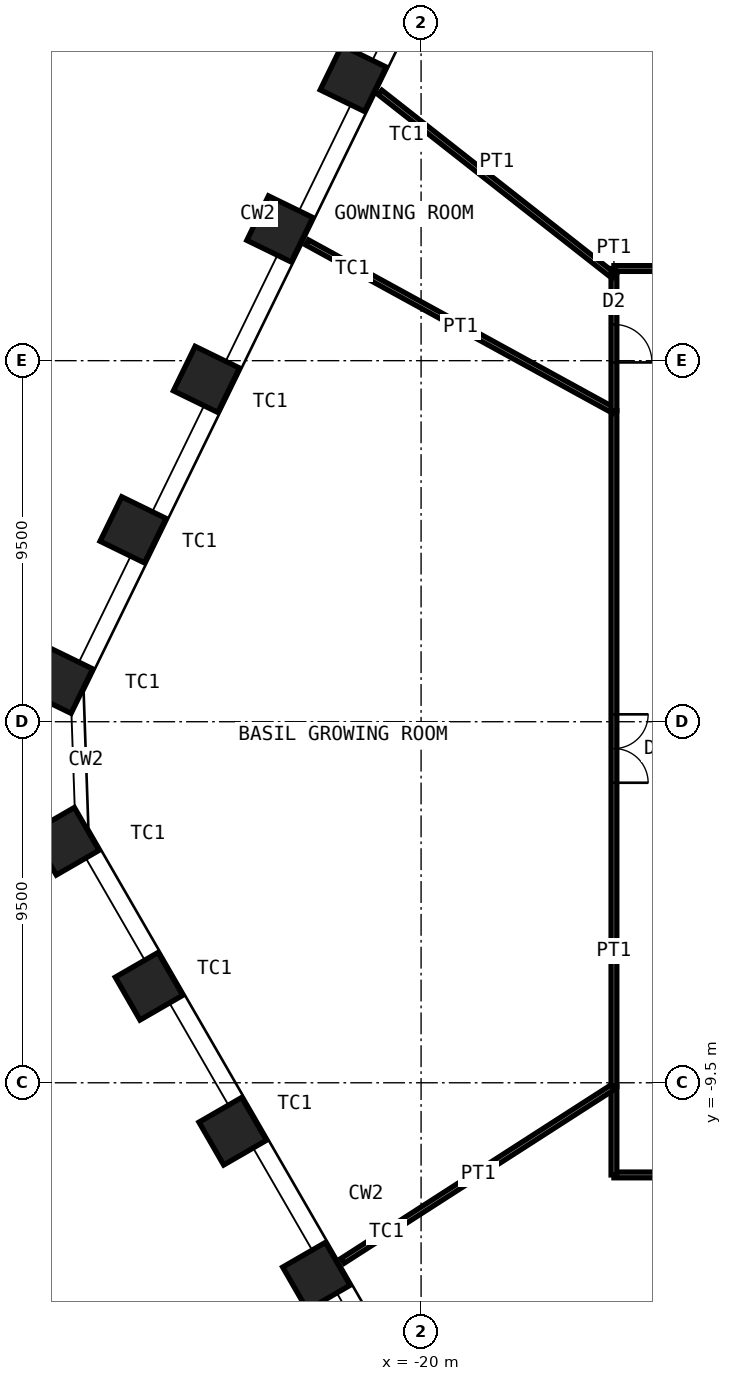
"""IFC4 building model, lengths in metres.
Left out: names, types, materials, properties, quantities, classifications, styles, units other than length and angle.
Written with IfcOpenShell. Run it as: python <this file> out.ifc"""

import sys

from ifc_helpers import new_model, si_unit, direction, frame, frame_2d, origin, origin_2d, place, context, subcontext, project, spatial, rectangle, hollow_rectangle, extrude, element, fill, save


model = new_model("IFC4")
c1 = context("Model", 3, precision=1e-05, world=origin(), true_north=direction((0.0, 1.0)))
c2 = subcontext(c1, "Body", "Model", "MODEL_VIEW")
j1 = project(units=[si_unit("LENGTHUNIT", "METRE"), si_unit("PLANEANGLEUNIT", "RADIAN")], contexts=[c1])
p1 = place(None, origin())
s1 = spatial("IfcSite", under=j1, at=p1, CompositionType="ELEMENT")
p2 = place(p1, origin())
s2 = spatial("IfcBuilding", under=s1, at=p2, CompositionType="ELEMENT")
p3 = place(p2, frame((0.0, 0.0, 52.0)))
s3 = spatial("IfcBuildingStorey", under=s2, at=p3, CompositionType="ELEMENT", Elevation=52.0)
for number, where, z_axis, x_axis in (
    (1, (-22.754, -14.589, 0.0), (0.0, 0.0, 1.0), (0.5, -0.866, 0.0)),
    (2, (-24.956, -10.775, 0.0), (0.0, 0.0, 1.0), (0.5, -0.866, 0.0)),
    (3, (-27.158, -6.96, 0.0), (0.0, 0.0, 1.0), (0.5, -0.866, 0.0)),
    (4, (-29.361, -3.146, 0.0), (0.0, 0.0, 1.0), (0.5, -0.866, 0.0)),
    (5, (-29.509, 1.09, 0.0), (0.0, 0.0, 1.0), (-0.438, -0.899, 0.0)),
    (6, (-27.578, 5.049, 0.0), (0.0, 0.0, 1.0), (-0.438, -0.899, 0.0)),
    (7, (-25.647, 9.008, 0.0), (0.0, 0.0, 1.0), (-0.438, -0.899, 0.0)),
    (8, (-23.716, 12.966, 0.0), (0.0, 0.0, 1.0), (-0.438, -0.899, 0.0)),
    (9, (-21.785, 16.925, 0.0), (0.0, 0.0, 1.0), (-0.438, -0.899, 0.0)),
):
    element("IfcColumn", number, at=place(p3, frame(where, z_axis=z_axis, x_axis=x_axis)), inside=s3, PredefinedType="COLUMN", context=c2, shape_type="SweptSolid", body=[
        extrude(hollow_rectangle(XDim=1.3, YDim=1.3, WallThickness=0.1, at=origin_2d()), origin(), (0.0, 0.0, 1.0), 5.0),
    ])
p4 = place(p3, frame((-5.516, -11.925, 0.0), z_axis=(0.0, 0.0, 1.0), x_axis=(-1.0, 0.0, 0.0)))
e10 = element("IfcWall", 10, at=p4, inside=s3, PredefinedType="PARTITIONING", context=c2, shape_type="SweptSolid", body=[
    extrude(rectangle(XDim=9.409, YDim=0.15, at=frame_2d((4.705, 0.0))), origin(), (0.0, 0.0, 1.0), 4.8),
])
p5 = place(p4, frame((3.805, 0.0, 0.0)))
e11 = element("IfcOpeningElement", 11, at=p5, cuts=e10, PredefinedType="OPENING", context=c2, shape_type="SweptSolid", body=[
    extrude(rectangle(XDim=1.8, YDim=2.4, at=frame_2d((0.9, 1.2))), frame((0.0, 0.085, 0.0), z_axis=(0.0, -1.0, 0.0), x_axis=(1.0, 0.0, 0.0)), (0.0, 0.0, 1.0), 0.17),
])
p6 = place(p3, frame((-14.925, -11.925, 0.0), z_axis=(0.0, 0.0, 1.0), x_axis=(0.0, 1.0, 0.0)))
e12 = element("IfcWall", 12, at=p6, inside=s3, PredefinedType="PARTITIONING", context=c2, shape_type="SweptSolid", body=[
    extrude(rectangle(XDim=2.329, YDim=0.15, at=frame_2d((1.165, 0.0))), origin(), (0.0, 0.0, 1.0), 4.8),
])
p7 = place(p3, frame((-22.063, -14.185, 0.0), z_axis=(0.0, 0.0, 1.0), x_axis=(0.841158845851, 0.540788124912, 0.0)))
e13 = element("IfcWall", 13, at=p7, inside=s3, PredefinedType="PARTITIONING", context=c2, shape_type="SweptSolid", body=[
    extrude(rectangle(XDim=8.486, YDim=0.15, at=frame_2d((4.243, 0.0))), origin(), (0.0, 0.0, 1.0), 3.7),
])
p8 = place(p3, frame((-14.925, -9.596, 0.0), z_axis=(0.0, 0.0, 1.0), x_axis=(0.0, 1.0, 0.0)))
e14 = element("IfcWall", 14, at=p8, inside=s3, PredefinedType="PARTITIONING", context=c2, shape_type="SweptSolid", body=[
    extrude(rectangle(XDim=17.78, YDim=0.15, at=frame_2d((8.89, 0.0))), origin(), (0.0, 0.0, 1.0), 4.8),
])
p9 = place(p8, frame((7.99, 0.0, 0.0)))
e15 = element("IfcOpeningElement", 15, at=p9, cuts=e14, PredefinedType="OPENING", context=c2, shape_type="SweptSolid", body=[
    extrude(rectangle(XDim=1.8, YDim=2.4, at=frame_2d((0.9, 1.2))), frame((0.0, 0.085, 0.0), z_axis=(0.0, -1.0, 0.0), x_axis=(1.0, 0.0, 0.0)), (0.0, 0.0, 1.0), 0.17),
])
p10 = place(p3, frame((-22.999, 12.612, 0.0), z_axis=(0.0, 0.0, 1.0), x_axis=(0.876826470608, -0.480806967963, 0.0)))
e16 = element("IfcWall", 16, at=p10, inside=s3, PredefinedType="PARTITIONING", context=c2, shape_type="SweptSolid", body=[
    extrude(rectangle(XDim=9.208, YDim=0.15, at=frame_2d((4.604, 0.0))), origin(), (0.0, 0.0, 1.0), 3.7),
])
p11 = place(p3, frame((-14.925, 8.184, 0.0), z_axis=(0.0, 0.0, 1.0), x_axis=(0.0, 1.0, 0.0)))
e17 = element("IfcWall", 17, at=p11, inside=s3, PredefinedType="PARTITIONING", context=c2, shape_type="SweptSolid", body=[
    extrude(rectangle(XDim=3.54, YDim=0.15, at=frame_2d((1.77, 0.0))), origin(), (0.0, 0.0, 1.0), 4.8),
])
p12 = place(p11, frame((1.27, 0.0, 0.0)))
e18 = element("IfcOpeningElement", 18, at=p12, cuts=e17, PredefinedType="OPENING", context=c2, shape_type="SweptSolid", body=[
    extrude(rectangle(XDim=1.0, YDim=2.4, at=frame_2d((0.5, 1.2))), frame((0.0, 0.085, 0.0), z_axis=(0.0, -1.0, 0.0), x_axis=(1.0, 0.0, 0.0)), (0.0, 0.0, 1.0), 0.17),
])
p13 = place(p3, frame((-21.077, 16.557, 0.0), z_axis=(0.0, 0.0, 1.0), x_axis=(0.78639413325, -0.617725074115, 0.0)))
e19 = element("IfcWall", 19, at=p13, inside=s3, PredefinedType="PARTITIONING", context=c2, shape_type="SweptSolid", body=[
    extrude(rectangle(XDim=7.823, YDim=0.15, at=frame_2d((3.912, 0.0))), origin(), (0.0, 0.0, 1.0), 3.7),
])
p14 = place(p3, frame((-14.925, 11.819, 0.0), z_axis=(0.0, 0.0, 1.0), x_axis=(0.0, 1.0, 0.0)))
e20 = element("IfcWall", 20, at=p14, inside=s3, PredefinedType="PARTITIONING", context=c2, shape_type="SweptSolid", body=[
    extrude(rectangle(XDim=0.106, YDim=0.15, at=frame_2d((0.053, 0.0))), origin(), (0.0, 0.0, 1.0), 4.8),
])
p15 = place(p3, frame((-14.925, 11.925, 0.0), z_axis=(0.0, 0.0, 1.0), x_axis=(1.0, 0.0, 0.0)))
e21 = element("IfcWall", 21, at=p15, inside=s3, PredefinedType="PARTITIONING", context=c2, shape_type="SweptSolid", body=[
    extrude(rectangle(XDim=10.361, YDim=0.15, at=frame_2d((5.18, 0.0))), origin(), (0.0, 0.0, 1.0), 4.8),
])
p16 = place(p15, frame((4.28, 0.0, 0.0)))
e22 = element("IfcOpeningElement", 22, at=p16, cuts=e21, PredefinedType="OPENING", context=c2, shape_type="SweptSolid", body=[
    extrude(rectangle(XDim=1.8, YDim=2.4, at=frame_2d((0.9, 1.2))), frame((0.0, 0.085, 0.0), z_axis=(0.0, -1.0, 0.0), x_axis=(1.0, 0.0, 0.0)), (0.0, 0.0, 1.0), 0.17),
])
p17 = place(p9, origin())
e23 = element("IfcDoor", 23, at=p17, inside=s3, OperationType="DOUBLE_DOOR_DOUBLE_SWING", PredefinedType="DOOR", context=c2, shape_type="SweptSolid", body=[
    extrude(rectangle(XDim=1.8, YDim=2.4, at=frame_2d((0.9, 1.2))), frame((0.0, 0.025, 0.0), z_axis=(0.0, -1.0, 0.0), x_axis=(1.0, 0.0, 0.0)), (0.0, 0.0, 1.0), 0.05),
])
fill(e15, e23)
p18 = place(p12, origin())
e24 = element("IfcDoor", 24, at=p18, inside=s3, OperationType="SINGLE_SWING_LEFT", PredefinedType="DOOR", context=c2, shape_type="SweptSolid", body=[
    extrude(rectangle(XDim=1.0, YDim=2.4, at=frame_2d((0.5, 1.2))), frame((0.0, 0.025, 0.0), z_axis=(0.0, -1.0, 0.0), x_axis=(1.0, 0.0, 0.0)), (0.0, 0.0, 1.0), 0.05),
])
fill(e18, e24)
save(model, sys.argv[1])
